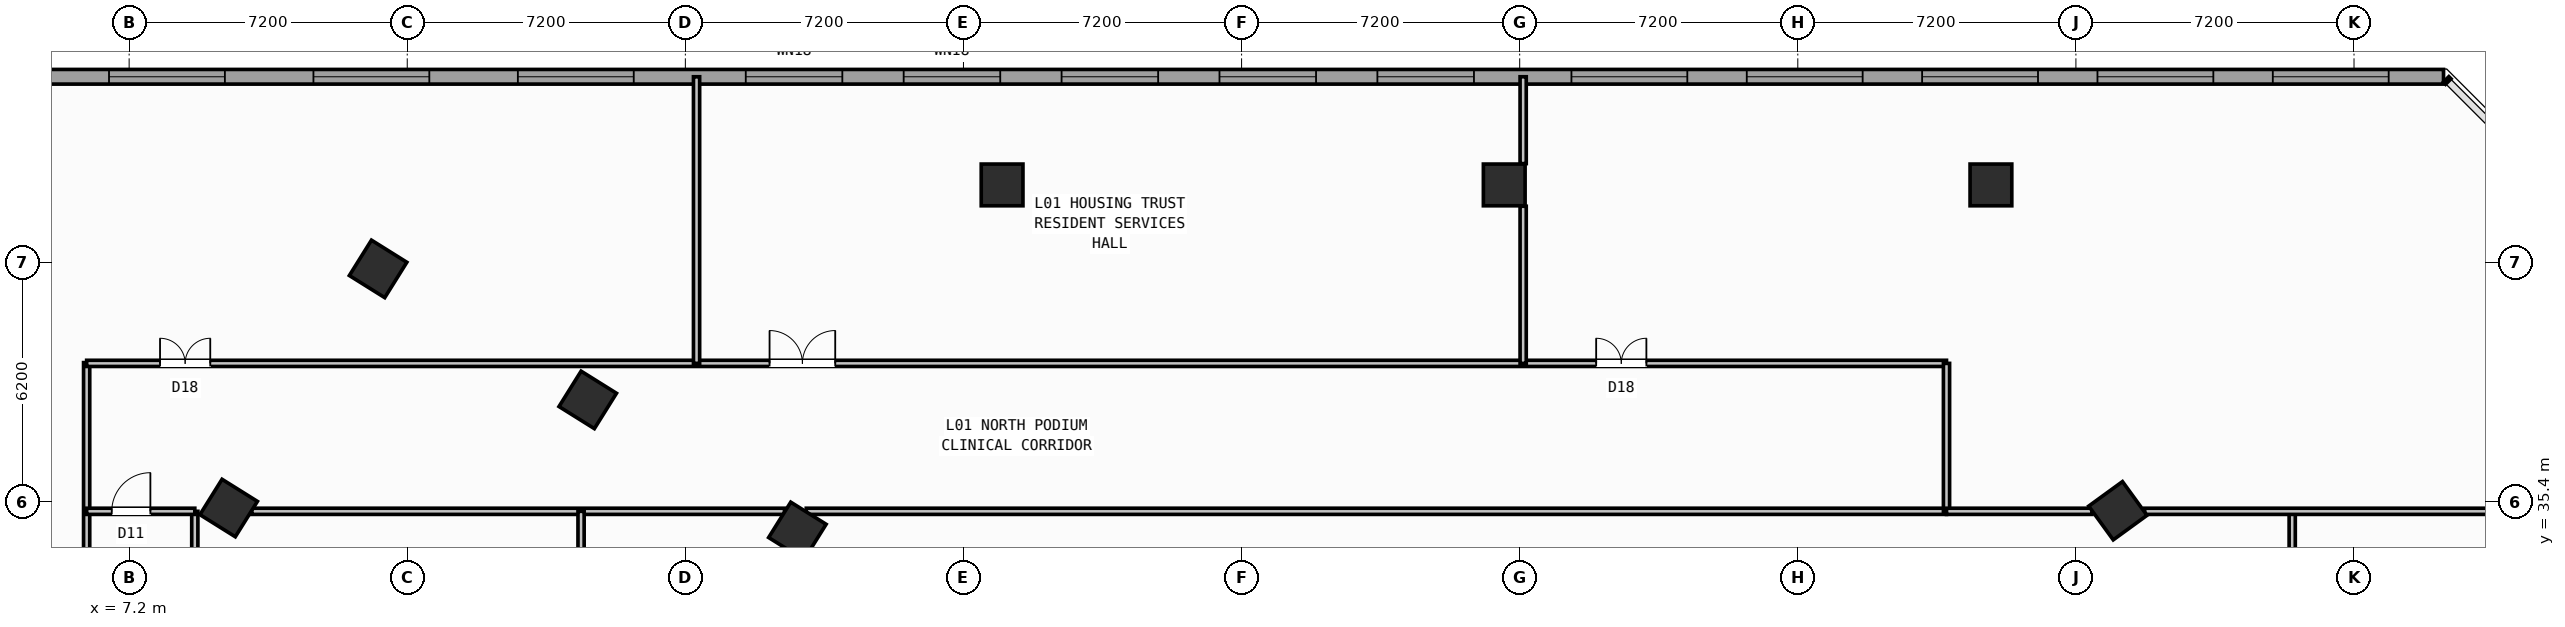
"""IFC4 building model, lengths in metres.
Left out: names, types, materials, properties, quantities, classifications, styles, units other than length and angle.
Written with IfcOpenShell. Run it as: python <this file> out.ifc"""

import sys

from ifc_helpers import new_model, si_unit, direction, frame, frame_2d, origin, origin_2d, place, context, subcontext, project, spatial, rectangle, hollow_rectangle, extrude, source, transform, mapped, element, fill, save


model = new_model("IFC4")
c1 = context("Model", 3, precision=1e-05, world=origin(), true_north=direction((0.0, 1.0)))
c2 = subcontext(c1, "Body", "Model", "MODEL_VIEW")
j1 = project(units=[si_unit("LENGTHUNIT", "METRE"), si_unit("PLANEANGLEUNIT", "RADIAN")], contexts=[c1])
p1 = place(None, origin())
s1 = spatial("IfcSite", under=j1, at=p1, CompositionType="ELEMENT")
p2 = place(p1, origin())
s2 = spatial("IfcBuilding", under=s1, at=p2, CompositionType="ELEMENT")
p3 = place(p2, frame((0.0, 0.0, 5.4)))
s3 = spatial("IfcBuildingStorey", under=s2, at=p3, CompositionType="ELEMENT", Elevation=5.4)
m1 = source(origin(), c2, "Body", "SweptSolid", [
    extrude(hollow_rectangle(XDim=1.08, YDim=1.08, WallThickness=0.04, at=origin_2d()), origin(), (0.0, 0.0, 1.0), 4.8),
])
for number, where, z_axis, x_axis in (
    (1, (29.8, 43.6, 0.0), (0.0, 0.0, 1.0), (1.0, 0.0, 0.0)),
    (2, (42.8, 43.6, 0.0), (0.0, 0.0, 1.0), (1.0, 0.0, 0.0)),
    (3, (55.4, 43.6, 0.0), (0.0, 0.0, 1.0), (1.0, 0.0, 0.0)),
    (4, (24.5, 34.643, 0.0), (0.0, 0.0, 1.0), (-0.848, 0.53, 0.0)),
    (5, (19.073, 38.034, 0.0), (0.0, 0.0, 1.0), (-0.848, 0.53, 0.0)),
    (6, (13.646, 41.426, 0.0), (0.0, 0.0, 1.0), (-0.848, 0.53, 0.0)),
    (7, (9.777, 35.235, 0.0), (0.0, 0.0, 1.0), (-0.848, 0.53, 0.0)),
    (8, (58.686, 35.165, 0.0), (0.0, 0.0, 1.0), (0.809, 0.588, 0.0)),
):
    element("IfcColumn", number, at=place(p3, frame(where, z_axis=z_axis, x_axis=x_axis)), inside=s3, PredefinedType="COLUMN", context=c2, shape_type="MappedRepresentation", body=[
        mapped(m1, transform((0.0, 0.0, 0.0), scale=1.0)),
    ])
p4 = place(p3, frame((4.883, 46.4, 0.0), z_axis=(0.0, 0.0, 1.0), x_axis=(1.0, 0.0, 0.0)))
e9 = element("IfcWall", 9, at=p4, inside=s3, PredefinedType="STANDARD", context=c2, shape_type="SweptSolid", body=[
    extrude(rectangle(XDim=62.234, YDim=0.38, at=frame_2d((31.117, 0.0))), origin(), (0.0, 0.0, 1.0), 4.45),
])
p5 = place(p4, frame((1.796, 0.0, 0.7)))
e10 = element("IfcOpeningElement", 10, at=p5, cuts=e9, PredefinedType="OPENING", context=c2, shape_type="SweptSolid", body=[
    extrude(rectangle(XDim=3.0, YDim=2.3, at=frame_2d((1.5, 1.15))), frame((0.0, 0.2, 0.0), z_axis=(0.0, -1.0, 0.0), x_axis=(1.0, 0.0, 0.0)), (0.0, 0.0, 1.0), 0.4),
])
p6 = place(p4, frame((7.089, 0.0, 0.7)))
e11 = element("IfcOpeningElement", 11, at=p6, cuts=e9, PredefinedType="OPENING", context=c2, shape_type="SweptSolid", body=[
    extrude(rectangle(XDim=3.0, YDim=2.3, at=frame_2d((1.5, 1.15))), frame((0.0, 0.2, 0.0), z_axis=(0.0, -1.0, 0.0), x_axis=(1.0, 0.0, 0.0)), (0.0, 0.0, 1.0), 0.4),
])
p7 = place(p4, frame((12.381, 0.0, 0.7)))
e12 = element("IfcOpeningElement", 12, at=p7, cuts=e9, PredefinedType="OPENING", context=c2, shape_type="SweptSolid", body=[
    extrude(rectangle(XDim=3.0, YDim=2.3, at=frame_2d((1.5, 1.15))), frame((0.0, 0.2, 0.0), z_axis=(0.0, -1.0, 0.0), x_axis=(1.0, 0.0, 0.0)), (0.0, 0.0, 1.0), 0.4),
])
p8 = place(p4, frame((18.281, 0.0, 0.9)))
e13 = element("IfcOpeningElement", 13, at=p8, cuts=e9, PredefinedType="OPENING", context=c2, shape_type="SweptSolid", body=[
    extrude(rectangle(XDim=2.5, YDim=1.9, at=frame_2d((1.25, 0.95))), frame((0.0, 0.2, 0.0), z_axis=(0.0, -1.0, 0.0), x_axis=(1.0, 0.0, 0.0)), (0.0, 0.0, 1.0), 0.4),
])
p9 = place(p4, frame((22.369, 0.0, 0.9)))
e14 = element("IfcOpeningElement", 14, at=p9, cuts=e9, PredefinedType="OPENING", context=c2, shape_type="SweptSolid", body=[
    extrude(rectangle(XDim=2.5, YDim=1.9, at=frame_2d((1.25, 0.95))), frame((0.0, 0.2, 0.0), z_axis=(0.0, -1.0, 0.0), x_axis=(1.0, 0.0, 0.0)), (0.0, 0.0, 1.0), 0.4),
])
p10 = place(p4, frame((26.457, 0.0, 0.9)))
e15 = element("IfcOpeningElement", 15, at=p10, cuts=e9, PredefinedType="OPENING", context=c2, shape_type="SweptSolid", body=[
    extrude(rectangle(XDim=2.5, YDim=1.9, at=frame_2d((1.25, 0.95))), frame((0.0, 0.2, 0.0), z_axis=(0.0, -1.0, 0.0), x_axis=(1.0, 0.0, 0.0)), (0.0, 0.0, 1.0), 0.4),
])
p11 = place(p4, frame((30.545, 0.0, 0.9)))
e16 = element("IfcOpeningElement", 16, at=p11, cuts=e9, PredefinedType="OPENING", context=c2, shape_type="SweptSolid", body=[
    extrude(rectangle(XDim=2.5, YDim=1.9, at=frame_2d((1.25, 0.95))), frame((0.0, 0.2, 0.0), z_axis=(0.0, -1.0, 0.0), x_axis=(1.0, 0.0, 0.0)), (0.0, 0.0, 1.0), 0.4),
])
p12 = place(p4, frame((34.633, 0.0, 0.9)))
e17 = element("IfcOpeningElement", 17, at=p12, cuts=e9, PredefinedType="OPENING", context=c2, shape_type="SweptSolid", body=[
    extrude(rectangle(XDim=2.5, YDim=1.9, at=frame_2d((1.25, 0.95))), frame((0.0, 0.2, 0.0), z_axis=(0.0, -1.0, 0.0), x_axis=(1.0, 0.0, 0.0)), (0.0, 0.0, 1.0), 0.4),
])
p13 = place(p4, frame((39.657, 0.0, 0.7)))
e18 = element("IfcOpeningElement", 18, at=p13, cuts=e9, PredefinedType="OPENING", context=c2, shape_type="SweptSolid", body=[
    extrude(rectangle(XDim=3.0, YDim=2.3, at=frame_2d((1.5, 1.15))), frame((0.0, 0.2, 0.0), z_axis=(0.0, -1.0, 0.0), x_axis=(1.0, 0.0, 0.0)), (0.0, 0.0, 1.0), 0.4),
])
p14 = place(p4, frame((44.196, 0.0, 0.7)))
e19 = element("IfcOpeningElement", 19, at=p14, cuts=e9, PredefinedType="OPENING", context=c2, shape_type="SweptSolid", body=[
    extrude(rectangle(XDim=3.0, YDim=2.3, at=frame_2d((1.5, 1.15))), frame((0.0, 0.2, 0.0), z_axis=(0.0, -1.0, 0.0), x_axis=(1.0, 0.0, 0.0)), (0.0, 0.0, 1.0), 0.4),
])
p15 = place(p4, frame((48.736, 0.0, 0.7)))
e20 = element("IfcOpeningElement", 20, at=p15, cuts=e9, PredefinedType="OPENING", context=c2, shape_type="SweptSolid", body=[
    extrude(rectangle(XDim=3.0, YDim=2.3, at=frame_2d((1.5, 1.15))), frame((0.0, 0.2, 0.0), z_axis=(0.0, -1.0, 0.0), x_axis=(1.0, 0.0, 0.0)), (0.0, 0.0, 1.0), 0.4),
])
p16 = place(p4, frame((53.275, 0.0, 0.7)))
e21 = element("IfcOpeningElement", 21, at=p16, cuts=e9, PredefinedType="OPENING", context=c2, shape_type="SweptSolid", body=[
    extrude(rectangle(XDim=3.0, YDim=2.3, at=frame_2d((1.5, 1.15))), frame((0.0, 0.2, 0.0), z_axis=(0.0, -1.0, 0.0), x_axis=(1.0, 0.0, 0.0)), (0.0, 0.0, 1.0), 0.4),
])
p17 = place(p4, frame((57.815, 0.0, 0.7)))
e22 = element("IfcOpeningElement", 22, at=p17, cuts=e9, PredefinedType="OPENING", context=c2, shape_type="SweptSolid", body=[
    extrude(rectangle(XDim=3.0, YDim=2.3, at=frame_2d((1.5, 1.15))), frame((0.0, 0.2, 0.0), z_axis=(0.0, -1.0, 0.0), x_axis=(1.0, 0.0, 0.0)), (0.0, 0.0, 1.0), 0.4),
])
p18 = place(p3, frame((6.1, 29.576, 0.0), z_axis=(0.0, 0.0, 1.0), x_axis=(0.0, 1.0, 0.0)))
e23 = element("IfcWall", 23, at=p18, inside=s3, PredefinedType="PARTITIONING", context=c2, shape_type="SweptSolid", body=[
    extrude(rectangle(XDim=9.424, YDim=0.16, at=frame_2d((4.712, 0.0))), origin(), (0.0, 0.0, 1.0), 4.44),
])
p19 = place(p3, frame((8.9, 10.58, 0.0), z_axis=(0.0, 0.0, 1.0), x_axis=(0.0, 1.0, 0.0)))
e24 = element("IfcWall", 24, at=p19, inside=s3, PredefinedType="PARTITIONING", context=c2, shape_type="SweptSolid", body=[
    extrude(rectangle(XDim=24.57, YDim=0.16, at=frame_2d((12.285, 0.0))), origin(), (0.0, 0.0, 1.0), 4.44),
])
p20 = place(p3, frame((10.375, 35.15, 0.0), z_axis=(0.0, 0.0, 1.0), x_axis=(1.0, 0.0, 0.0)))
e25 = element("IfcWall", 25, at=p20, inside=s3, PredefinedType="PARTITIONING", context=c2, shape_type="SweptSolid", body=[
    extrude(rectangle(XDim=13.792, YDim=0.16, at=frame_2d((6.896, 0.0))), origin(), (0.0, 0.0, 1.0), 4.44),
])
p21 = place(p3, frame((24.73, 35.15, 0.0), z_axis=(0.0, 0.0, 1.0), x_axis=(1.0, 0.0, 0.0)))
e26 = element("IfcWall", 26, at=p21, inside=s3, PredefinedType="PARTITIONING", context=c2, shape_type="SweptSolid", body=[
    extrude(rectangle(XDim=29.52, YDim=0.16, at=frame_2d((14.76, 0.0))), origin(), (0.0, 0.0, 1.0), 4.44),
])
p22 = place(p3, frame((6.1, 38.98, 0.0), z_axis=(0.0, 0.0, 1.0), x_axis=(1.0, 0.0, 0.0)))
e27 = element("IfcWall", 27, at=p22, inside=s3, PredefinedType="PARTITIONING", context=c2, shape_type="SweptSolid", body=[
    extrude(rectangle(XDim=48.15, YDim=0.16, at=frame_2d((24.075, 0.0))), origin(), (0.0, 0.0, 1.0), 4.44),
])
p23 = place(p22, frame((1.9, 0.0, 0.0)))
e28 = element("IfcOpeningElement", 28, at=p23, cuts=e27, PredefinedType="OPENING", context=c2, shape_type="SweptSolid", body=[
    extrude(rectangle(XDim=1.3, YDim=2.15, at=frame_2d((0.65, 1.075))), frame((0.0, 0.09, 0.0), z_axis=(0.0, -1.0, 0.0), x_axis=(1.0, 0.0, 0.0)), (0.0, 0.0, 1.0), 0.18),
])
p24 = place(p22, frame((17.68, 0.0, 0.0)))
e29 = element("IfcOpeningElement", 29, at=p24, cuts=e27, PredefinedType="OPENING", context=c2, shape_type="SweptSolid", body=[
    extrude(rectangle(XDim=1.7, YDim=2.2, at=frame_2d((0.85, 1.1))), frame((0.0, 0.09, 0.0), z_axis=(0.0, -1.0, 0.0), x_axis=(1.0, 0.0, 0.0)), (0.0, 0.0, 1.0), 0.18),
])
p25 = place(p22, frame((39.08, 0.0, 0.0)))
e30 = element("IfcOpeningElement", 30, at=p25, cuts=e27, PredefinedType="OPENING", context=c2, shape_type="SweptSolid", body=[
    extrude(rectangle(XDim=1.3, YDim=2.15, at=frame_2d((0.65, 1.075))), frame((0.0, 0.09, 0.0), z_axis=(0.0, -1.0, 0.0), x_axis=(1.0, 0.0, 0.0)), (0.0, 0.0, 1.0), 0.18),
])
p26 = place(p3, frame((54.25, 35.15, 0.0), z_axis=(0.0, 0.0, 1.0), x_axis=(0.0, 1.0, 0.0)))
e31 = element("IfcWall", 31, at=p26, inside=s3, PredefinedType="PARTITIONING", context=c2, shape_type="SweptSolid", body=[
    extrude(rectangle(XDim=3.83, YDim=0.16, at=frame_2d((1.915, 0.0))), origin(), (0.0, 0.0, 1.0), 4.44),
])
p27 = place(p3, frame((6.1, 35.15, 0.0), z_axis=(0.0, 0.0, 1.0), x_axis=(1.0, 0.0, 0.0)))
e32 = element("IfcWall", 32, at=p27, inside=s3, PredefinedType="PARTITIONING", context=c2, shape_type="SweptSolid", body=[
    extrude(rectangle(XDim=2.8, YDim=0.16, at=frame_2d((1.4, 0.0))), origin(), (0.0, 0.0, 1.0), 4.44),
])
p28 = place(p27, frame((0.65, 0.0, 0.0)))
e33 = element("IfcOpeningElement", 33, at=p28, cuts=e32, PredefinedType="OPENING", context=c2, shape_type="SweptSolid", body=[
    extrude(rectangle(XDim=1.0, YDim=2.1, at=frame_2d((0.5, 1.05))), frame((0.0, 0.09, 0.0), z_axis=(0.0, -1.0, 0.0), x_axis=(1.0, 0.0, 0.0)), (0.0, 0.0, 1.0), 0.18),
])
p29 = place(p3, frame((21.89, 38.98, 0.0), z_axis=(0.0, 0.0, 1.0), x_axis=(0.0, 1.0, 0.0)))
e34 = element("IfcWall", 34, at=p29, inside=s3, PredefinedType="PARTITIONING", context=c2, shape_type="SweptSolid", body=[
    extrude(rectangle(XDim=7.42, YDim=0.16, at=frame_2d((3.71, 0.0))), origin(), (0.0, 0.0, 1.0), 4.44),
])
p30 = place(p3, frame((43.29, 38.98, 0.0), z_axis=(0.0, 0.0, 1.0), x_axis=(0.0, 1.0, 0.0)))
e35 = element("IfcWall", 35, at=p30, inside=s3, PredefinedType="PARTITIONING", context=c2, shape_type="SweptSolid", body=[
    extrude(rectangle(XDim=4.068, YDim=0.16, at=frame_2d((2.034, 0.0))), origin(), (0.0, 0.0, 1.0), 4.44),
])
p31 = place(p3, frame((43.29, 44.152, 0.0), z_axis=(0.0, 0.0, 1.0), x_axis=(0.0, 1.0, 0.0)))
e36 = element("IfcWall", 36, at=p31, inside=s3, PredefinedType="PARTITIONING", context=c2, shape_type="SweptSolid", body=[
    extrude(rectangle(XDim=2.248, YDim=0.16, at=frame_2d((1.124, 0.0))), origin(), (0.0, 0.0, 1.0), 4.44),
])
p32 = place(p3, frame((18.9, 10.58, 0.0), z_axis=(0.0, 0.0, 1.0), x_axis=(0.0, 1.0, 0.0)))
e37 = element("IfcWall", 37, at=p32, inside=s3, PredefinedType="PARTITIONING", context=c2, shape_type="SweptSolid", body=[
    extrude(rectangle(XDim=24.57, YDim=0.16, at=frame_2d((12.285, 0.0))), origin(), (0.0, 0.0, 1.0), 4.44),
])
p33 = place(p3, frame((63.2, 29.891, 0.0), z_axis=(0.0, 0.0, 1.0), x_axis=(0.0, 1.0, 0.0)))
e38 = element("IfcWall", 38, at=p33, inside=s3, PredefinedType="PARTITIONING", context=c2, shape_type="SweptSolid", body=[
    extrude(rectangle(XDim=5.259, YDim=0.16, at=frame_2d((2.629, 0.0))), origin(), (0.0, 0.0, 1.0), 4.44),
])
p34 = place(p3, frame((54.25, 35.15, 0.0), z_axis=(0.0, 0.0, 1.0), x_axis=(1.0, 0.0, 0.0)))
e39 = element("IfcWall", 39, at=p34, inside=s3, PredefinedType="PARTITIONING", context=c2, shape_type="SweptSolid", body=[
    extrude(rectangle(XDim=3.765, YDim=0.16, at=frame_2d((1.882, 0.0))), origin(), (0.0, 0.0, 1.0), 4.44),
])
p35 = place(p3, frame((59.379, 35.15, 0.0), z_axis=(0.0, 0.0, 1.0), x_axis=(1.0, 0.0, 0.0)))
e40 = element("IfcWall", 40, at=p35, inside=s3, PredefinedType="PARTITIONING", context=c2, shape_type="SweptSolid", body=[
    extrude(rectangle(XDim=11.021, YDim=0.16, at=frame_2d((5.51, 0.0))), origin(), (0.0, 0.0, 1.0), 4.44),
])
m2 = source(origin(), c2, "Body", "SweptSolid", [
    extrude(rectangle(XDim=3.0, YDim=2.3, at=frame_2d((1.5, 1.15))), frame((0.0, 0.03, 0.0), z_axis=(0.0, -1.0, 0.0), x_axis=(1.0, 0.0, 0.0)), (0.0, 0.0, 1.0), 0.06),
])
p36 = place(p5, origin())
e41 = element("IfcWindow", 41, at=p36, inside=s3, PartitioningType="SINGLE_PANEL", PredefinedType="WINDOW", context=c2, shape_type="MappedRepresentation", body=[
    mapped(m2, transform((0.0, 0.0, 0.0), scale=1.0)),
])
fill(e10, e41)
p37 = place(p6, origin())
e42 = element("IfcWindow", 42, at=p37, inside=s3, PartitioningType="SINGLE_PANEL", PredefinedType="WINDOW", context=c2, shape_type="MappedRepresentation", body=[
    mapped(m2, transform((0.0, 0.0, 0.0), scale=1.0)),
])
fill(e11, e42)
p38 = place(p7, origin())
e43 = element("IfcWindow", 43, at=p38, inside=s3, PartitioningType="SINGLE_PANEL", PredefinedType="WINDOW", context=c2, shape_type="MappedRepresentation", body=[
    mapped(m2, transform((0.0, 0.0, 0.0), scale=1.0)),
])
fill(e12, e43)
m3 = source(origin(), c2, "Body", "SweptSolid", [
    extrude(rectangle(XDim=2.5, YDim=1.9, at=frame_2d((1.25, 0.95))), frame((0.0, 0.03, 0.0), z_axis=(0.0, -1.0, 0.0), x_axis=(1.0, 0.0, 0.0)), (0.0, 0.0, 1.0), 0.06),
])
p39 = place(p8, origin())
e44 = element("IfcWindow", 44, at=p39, inside=s3, PartitioningType="SINGLE_PANEL", PredefinedType="WINDOW", context=c2, shape_type="MappedRepresentation", body=[
    mapped(m3, transform((0.0, 0.0, 0.0), scale=1.0)),
])
fill(e13, e44)
p40 = place(p9, origin())
e45 = element("IfcWindow", 45, at=p40, inside=s3, PartitioningType="SINGLE_PANEL", PredefinedType="WINDOW", context=c2, shape_type="MappedRepresentation", body=[
    mapped(m3, transform((0.0, 0.0, 0.0), scale=1.0)),
])
fill(e14, e45)
p41 = place(p10, origin())
e46 = element("IfcWindow", 46, at=p41, inside=s3, PartitioningType="SINGLE_PANEL", PredefinedType="WINDOW", context=c2, shape_type="MappedRepresentation", body=[
    mapped(m3, transform((0.0, 0.0, 0.0), scale=1.0)),
])
fill(e15, e46)
p42 = place(p11, origin())
e47 = element("IfcWindow", 47, at=p42, inside=s3, PartitioningType="SINGLE_PANEL", PredefinedType="WINDOW", context=c2, shape_type="MappedRepresentation", body=[
    mapped(m3, transform((0.0, 0.0, 0.0), scale=1.0)),
])
fill(e16, e47)
p43 = place(p12, origin())
e48 = element("IfcWindow", 48, at=p43, inside=s3, PartitioningType="SINGLE_PANEL", PredefinedType="WINDOW", context=c2, shape_type="MappedRepresentation", body=[
    mapped(m3, transform((0.0, 0.0, 0.0), scale=1.0)),
])
fill(e17, e48)
p44 = place(p13, origin())
e49 = element("IfcWindow", 49, at=p44, inside=s3, PartitioningType="SINGLE_PANEL", PredefinedType="WINDOW", context=c2, shape_type="MappedRepresentation", body=[
    mapped(m2, transform((0.0, 0.0, 0.0), scale=1.0)),
])
fill(e18, e49)
p45 = place(p14, origin())
e50 = element("IfcWindow", 50, at=p45, inside=s3, PartitioningType="SINGLE_PANEL", PredefinedType="WINDOW", context=c2, shape_type="MappedRepresentation", body=[
    mapped(m2, transform((0.0, 0.0, 0.0), scale=1.0)),
])
fill(e19, e50)
p46 = place(p15, origin())
e51 = element("IfcWindow", 51, at=p46, inside=s3, PartitioningType="SINGLE_PANEL", PredefinedType="WINDOW", context=c2, shape_type="MappedRepresentation", body=[
    mapped(m2, transform((0.0, 0.0, 0.0), scale=1.0)),
])
fill(e20, e51)
p47 = place(p16, origin())
e52 = element("IfcWindow", 52, at=p47, inside=s3, PartitioningType="SINGLE_PANEL", PredefinedType="WINDOW", context=c2, shape_type="MappedRepresentation", body=[
    mapped(m2, transform((0.0, 0.0, 0.0), scale=1.0)),
])
fill(e21, e52)
p48 = place(p17, origin())
e53 = element("IfcWindow", 53, at=p48, inside=s3, PartitioningType="SINGLE_PANEL", PredefinedType="WINDOW", context=c2, shape_type="MappedRepresentation", body=[
    mapped(m2, transform((0.0, 0.0, 0.0), scale=1.0)),
])
fill(e22, e53)
m4 = source(origin(), c2, "Body", "SweptSolid", [
    extrude(rectangle(XDim=1.0, YDim=2.1, at=frame_2d((0.5, 1.05))), frame((0.0, 0.025, 0.0), z_axis=(0.0, -1.0, 0.0), x_axis=(1.0, 0.0, 0.0)), (0.0, 0.0, 1.0), 0.05),
])
p49 = place(p28, origin())
e54 = element("IfcDoor", 54, at=p49, inside=s3, OperationType="SINGLE_SWING_RIGHT", PredefinedType="DOOR", context=c2, shape_type="MappedRepresentation", body=[
    mapped(m4, transform((0.0, 0.0, 0.0), scale=1.0)),
])
fill(e33, e54)
m5 = source(origin(), c2, "Body", "SweptSolid", [
    extrude(rectangle(XDim=1.3, YDim=2.15, at=frame_2d((0.65, 1.075))), frame((0.0, 0.025, 0.0), z_axis=(0.0, -1.0, 0.0), x_axis=(1.0, 0.0, 0.0)), (0.0, 0.0, 1.0), 0.05),
])
p50 = place(p23, origin())
e55 = element("IfcDoor", 55, at=p50, inside=s3, OperationType="DOUBLE_DOOR_SINGLE_SWING", PredefinedType="DOOR", context=c2, shape_type="MappedRepresentation", body=[
    mapped(m5, transform((0.0, 0.0, 0.0), scale=1.0)),
])
fill(e28, e55)
m6 = source(origin(), c2, "Body", "SweptSolid", [
    extrude(rectangle(XDim=1.7, YDim=2.2, at=frame_2d((0.85, 1.1))), frame((0.0, 0.025, 0.0), z_axis=(0.0, -1.0, 0.0), x_axis=(1.0, 0.0, 0.0)), (0.0, 0.0, 1.0), 0.05),
])
p51 = place(p24, origin())
e56 = element("IfcDoor", 56, at=p51, inside=s3, OperationType="DOUBLE_DOOR_SINGLE_SWING", PredefinedType="DOOR", context=c2, shape_type="MappedRepresentation", body=[
    mapped(m6, transform((0.0, 0.0, 0.0), scale=1.0)),
])
fill(e29, e56)
p52 = place(p25, origin())
e57 = element("IfcDoor", 57, at=p52, inside=s3, OperationType="DOUBLE_DOOR_SINGLE_SWING", PredefinedType="DOOR", context=c2, shape_type="MappedRepresentation", body=[
    mapped(m5, transform((0.0, 0.0, 0.0), scale=1.0)),
])
fill(e30, e57)
save(model, sys.argv[1])
